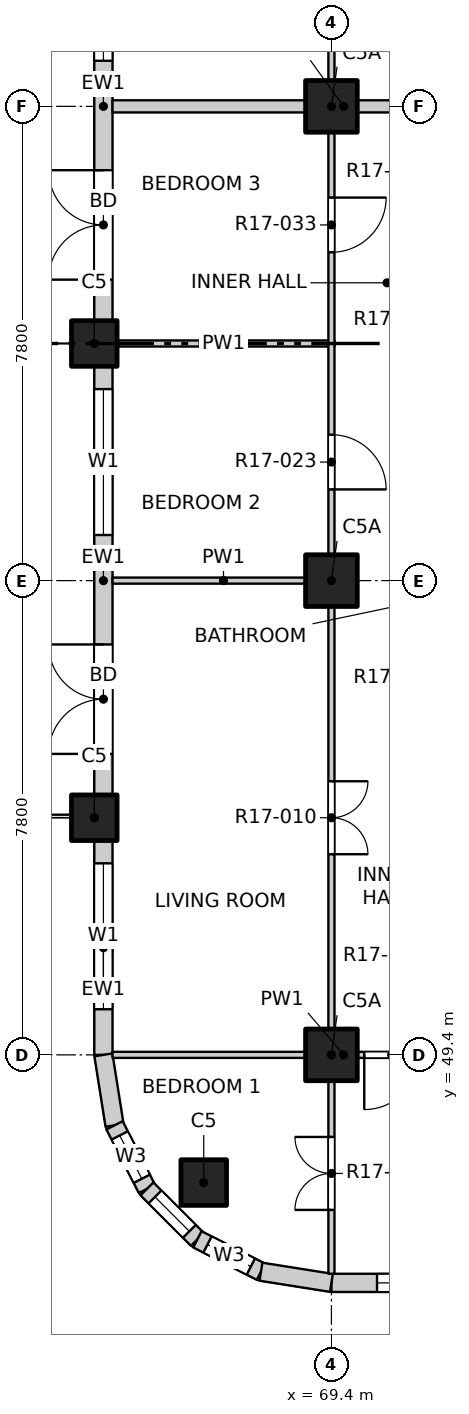
"""IFC4 building model, lengths in metres.
Left out: names, types, materials, properties, quantities, classifications, styles, units other than length and angle.
Written with IfcOpenShell. Run it as: python <this file> out.ifc"""

import sys

from ifc_helpers import new_model, si_unit, direction, frame, frame_2d, origin, origin_2d, place, context, subcontext, project, spatial, rectangle, extrude, element, fill, save


model = new_model("IFC4")
c1 = context("Model", 3, precision=1e-05, world=origin(), true_north=direction((0.0, 1.0)))
c2 = subcontext(c1, "Body", "Model", "MODEL_VIEW")
j1 = project(units=[si_unit("LENGTHUNIT", "METRE"), si_unit("PLANEANGLEUNIT", "RADIAN")], contexts=[c1])
p1 = place(None, origin())
s1 = spatial("IfcSite", under=j1, at=p1, CompositionType="ELEMENT")
p2 = place(p1, origin())
s2 = spatial("IfcBuilding", under=s1, at=p2, CompositionType="ELEMENT")
p3 = place(p2, frame((0.0, 0.0, 182.6)))
s3 = spatial("IfcBuildingStorey", under=s2, at=p3, CompositionType="ELEMENT", Elevation=182.6)
for number, where, z_axis, x_axis in (
    (1, (67.3, 47.3, -0.25), (0.0, 0.0, 1.0), (1.0, 0.0, 0.0)),
    (2, (65.5, 53.3, -0.25), (0.0, 0.0, 1.0), (1.0, 0.0, 0.0)),
    (3, (65.5, 61.1, -0.25), (0.0, 0.0, 1.0), (1.0, 0.0, 0.0)),
):
    element("IfcColumn", number, at=place(p3, frame(where, z_axis=z_axis, x_axis=x_axis)), inside=s3, PredefinedType="COLUMN", context=c2, shape_type="SweptSolid", body=[
        extrude(rectangle(XDim=0.75, YDim=0.75, at=origin_2d()), origin(), (0.0, 0.0, 1.0), 3.4),
    ])
for number, where, z_axis, x_axis in (
    (4, (69.4, 49.4, -0.25), (0.0, 0.0, 1.0), (1.0, 0.0, 0.0)),
    (5, (69.4, 57.2, -0.25), (0.0, 0.0, 1.0), (1.0, 0.0, 0.0)),
    (6, (69.4, 65.0, -0.25), (0.0, 0.0, 1.0), (1.0, 0.0, 0.0)),
):
    element("IfcColumn", number, at=place(p3, frame(where, z_axis=z_axis, x_axis=x_axis)), inside=s3, PredefinedType="COLUMN", context=c2, shape_type="SweptSolid", body=[
        extrude(rectangle(XDim=0.85, YDim=0.85, at=origin_2d()), origin(), (0.0, 0.0, 1.0), 3.4),
    ])
p4 = place(p3, frame((69.4, 45.65, 0.0), z_axis=(0.0, 0.0, 1.0), x_axis=(1.0, 0.0, 0.0)))
e7 = element("IfcWall", 7, at=p4, inside=s3, PredefinedType="SOLIDWALL", context=c2, shape_type="SweptSolid", body=[
    extrude(rectangle(XDim=3.525, YDim=0.3, at=frame_2d((1.763, 0.0))), origin(), (0.0, 0.0, 1.0), 2.7),
])
p5 = place(p4, frame((0.75, 0.0, 0.9)))
e8 = element("IfcOpeningElement", 8, at=p5, cuts=e7, PredefinedType="OPENING", context=c2, shape_type="SweptSolid", body=[
    extrude(rectangle(XDim=2.4, YDim=1.8, at=frame_2d((1.2, 0.9))), frame((0.0, 0.16, 0.0), z_axis=(0.0, -1.0, 0.0), x_axis=(1.0, 0.0, 0.0)), (0.0, 0.0, 1.0), 0.32),
])
p6 = place(p3, frame((65.65, 49.4, 0.0), z_axis=(0.0, 0.0, 1.0), x_axis=(0.0, 1.0, 0.0)))
e9 = element("IfcWall", 9, at=p6, inside=s3, PredefinedType="SOLIDWALL", context=c2, shape_type="SweptSolid", body=[
    extrude(rectangle(XDim=3.525, YDim=0.3, at=frame_2d((1.763, 0.0))), origin(), (0.0, 0.0, 1.0), 2.7),
])
p7 = place(p6, frame((0.75, 0.0, 0.9)))
e10 = element("IfcOpeningElement", 10, at=p7, cuts=e9, PredefinedType="OPENING", context=c2, shape_type="SweptSolid", body=[
    extrude(rectangle(XDim=2.4, YDim=1.8, at=frame_2d((1.2, 0.9))), frame((0.0, 0.16, 0.0), z_axis=(0.0, -1.0, 0.0), x_axis=(1.0, 0.0, 0.0)), (0.0, 0.0, 1.0), 0.32),
])
p8 = place(p3, frame((65.65, 53.675, 0.0), z_axis=(0.0, 0.0, 1.0), x_axis=(0.0, 1.0, 0.0)))
e11 = element("IfcWall", 11, at=p8, inside=s3, PredefinedType="SOLIDWALL", context=c2, shape_type="SweptSolid", body=[
    extrude(rectangle(XDim=7.05, YDim=0.3, at=frame_2d((3.525, 0.0))), origin(), (0.0, 0.0, 1.0), 2.7),
])
p9 = place(p8, frame((0.675, 0.0, 0.0)))
e12 = element("IfcOpeningElement", 12, at=p9, cuts=e11, PredefinedType="OPENING", context=c2, shape_type="SweptSolid", body=[
    extrude(rectangle(XDim=1.8, YDim=2.4, at=frame_2d((0.9, 1.2))), frame((0.0, 0.16, 0.0), z_axis=(0.0, -1.0, 0.0), x_axis=(1.0, 0.0, 0.0)), (0.0, 0.0, 1.0), 0.32),
])
p10 = place(p8, frame((4.275, 0.0, 0.9)))
e13 = element("IfcOpeningElement", 13, at=p10, cuts=e11, PredefinedType="OPENING", context=c2, shape_type="SweptSolid", body=[
    extrude(rectangle(XDim=2.4, YDim=1.8, at=frame_2d((1.2, 0.9))), frame((0.0, 0.16, 0.0), z_axis=(0.0, -1.0, 0.0), x_axis=(1.0, 0.0, 0.0)), (0.0, 0.0, 1.0), 0.32),
])
p11 = place(p3, frame((65.65, 61.475, 0.0), z_axis=(0.0, 0.0, 1.0), x_axis=(0.0, 1.0, 0.0)))
e14 = element("IfcWall", 14, at=p11, inside=s3, PredefinedType="SOLIDWALL", context=c2, shape_type="SweptSolid", body=[
    extrude(rectangle(XDim=7.05, YDim=0.3, at=frame_2d((3.525, 0.0))), origin(), (0.0, 0.0, 1.0), 2.7),
])
p12 = place(p11, frame((0.675, 0.0, 0.0)))
e15 = element("IfcOpeningElement", 15, at=p12, cuts=e14, PredefinedType="OPENING", context=c2, shape_type="SweptSolid", body=[
    extrude(rectangle(XDim=1.8, YDim=2.4, at=frame_2d((0.9, 1.2))), frame((0.0, 0.16, 0.0), z_axis=(0.0, -1.0, 0.0), x_axis=(1.0, 0.0, 0.0)), (0.0, 0.0, 1.0), 0.32),
])
p13 = place(p11, frame((4.275, 0.0, 0.9)))
e16 = element("IfcOpeningElement", 16, at=p13, cuts=e14, PredefinedType="OPENING", context=c2, shape_type="SweptSolid", body=[
    extrude(rectangle(XDim=2.4, YDim=1.8, at=frame_2d((1.2, 0.9))), frame((0.0, 0.16, 0.0), z_axis=(0.0, -1.0, 0.0), x_axis=(1.0, 0.0, 0.0)), (0.0, 0.0, 1.0), 0.32),
])
p14 = place(p3, frame((65.65, 49.4, 0.0), z_axis=(0.0, 0.0, 1.0), x_axis=(0.156496880861, -0.987678452879, 0.0)))
e17 = element("IfcWall", 17, at=p14, inside=s3, PredefinedType="SOLIDWALL", context=c2, shape_type="SweptSolid", body=[
    extrude(rectangle(XDim=1.173, YDim=0.3, at=frame_2d((0.586, 0.0))), origin(), (0.0, 0.0, 1.0), 2.7),
])
p15 = place(p3, frame((65.833, 48.241, 0.0), z_axis=(0.0, 0.0, 1.0), x_axis=(0.454025524128, -0.890988677504, 0.0)))
e18 = element("IfcWall", 18, at=p15, inside=s3, PredefinedType="SOLIDWALL", context=c2, shape_type="SweptSolid", body=[
    extrude(rectangle(XDim=1.173, YDim=0.3, at=frame_2d((0.587, 0.0))), origin(), (0.0, 0.0, 1.0), 2.7),
])
p16 = place(p15, frame((0.187, 0.0, 0.9)))
e19 = element("IfcOpeningElement", 19, at=p16, cuts=e18, PredefinedType="OPENING", context=c2, shape_type="SweptSolid", body=[
    extrude(rectangle(XDim=0.8, YDim=1.2, at=frame_2d((0.4, 0.6))), frame((0.0, 0.16, 0.0), z_axis=(0.0, -1.0, 0.0), x_axis=(1.0, 0.0, 0.0)), (0.0, 0.0, 1.0), 0.32),
])
p17 = place(p3, frame((66.366, 47.196, 0.0), z_axis=(0.0, 0.0, 1.0), x_axis=(0.707106781187, -0.707106781187, 0.0)))
e20 = element("IfcWall", 20, at=p17, inside=s3, PredefinedType="SOLIDWALL", context=c2, shape_type="SweptSolid", body=[
    extrude(rectangle(XDim=1.173, YDim=0.3, at=frame_2d((0.586, 0.0))), origin(), (0.0, 0.0, 1.0), 2.7),
])
p18 = place(p17, frame((0.187, 0.0, 0.9)))
e21 = element("IfcOpeningElement", 21, at=p18, cuts=e20, PredefinedType="OPENING", context=c2, shape_type="SweptSolid", body=[
    extrude(rectangle(XDim=0.8, YDim=1.2, at=frame_2d((0.4, 0.6))), frame((0.0, 0.16, 0.0), z_axis=(0.0, -1.0, 0.0), x_axis=(1.0, 0.0, 0.0)), (0.0, 0.0, 1.0), 0.32),
])
p19 = place(p3, frame((67.196, 46.366, 0.0), z_axis=(0.0, 0.0, 1.0), x_axis=(0.890988677504, -0.454025524128, 0.0)))
e22 = element("IfcWall", 22, at=p19, inside=s3, PredefinedType="SOLIDWALL", context=c2, shape_type="SweptSolid", body=[
    extrude(rectangle(XDim=1.173, YDim=0.3, at=frame_2d((0.587, 0.0))), origin(), (0.0, 0.0, 1.0), 2.7),
])
p20 = place(p19, frame((0.187, 0.0, 0.9)))
e23 = element("IfcOpeningElement", 23, at=p20, cuts=e22, PredefinedType="OPENING", context=c2, shape_type="SweptSolid", body=[
    extrude(rectangle(XDim=0.8, YDim=1.2, at=frame_2d((0.4, 0.6))), frame((0.0, 0.16, 0.0), z_axis=(0.0, -1.0, 0.0), x_axis=(1.0, 0.0, 0.0)), (0.0, 0.0, 1.0), 0.32),
])
p21 = place(p3, frame((68.241, 45.833, 0.0), z_axis=(0.0, 0.0, 1.0), x_axis=(0.987678452879, -0.156496880861, 0.0)))
e24 = element("IfcWall", 24, at=p21, inside=s3, PredefinedType="SOLIDWALL", context=c2, shape_type="SweptSolid", body=[
    extrude(rectangle(XDim=1.173, YDim=0.3, at=frame_2d((0.586, 0.0))), origin(), (0.0, 0.0, 1.0), 2.7),
])
p22 = place(p3, frame((65.8, 49.4, 0.0), z_axis=(0.0, 0.0, 1.0), x_axis=(1.0, 0.0, 0.0)))
e25 = element("IfcWall", 25, at=p22, inside=s3, PredefinedType="PARTITIONING", context=c2, shape_type="SweptSolid", body=[
    extrude(rectangle(XDim=7.6, YDim=0.1, at=frame_2d((3.8, 0.0))), origin(), (0.0, 0.0, 1.0), 3.15),
])
p23 = place(p22, frame((4.14, 0.0, 0.0)))
e26 = element("IfcOpeningElement", 26, at=p23, cuts=e25, PredefinedType="OPENING", context=c2, shape_type="SweptSolid", body=[
    extrude(rectangle(XDim=0.9, YDim=2.1, at=frame_2d((0.45, 1.05))), frame((0.0, 0.06, 0.0), z_axis=(0.0, -1.0, 0.0), x_axis=(1.0, 0.0, 0.0)), (0.0, 0.0, 1.0), 0.12),
])
p24 = place(p3, frame((65.8, 57.2, 0.0), z_axis=(0.0, 0.0, 1.0), x_axis=(1.0, 0.0, 0.0)))
e27 = element("IfcWall", 27, at=p24, inside=s3, PredefinedType="PARTITIONING", context=c2, shape_type="SweptSolid", body=[
    extrude(rectangle(XDim=3.65, YDim=0.1, at=frame_2d((1.825, 0.0))), origin(), (0.0, 0.0, 1.0), 3.15),
])
p25 = place(p3, frame((65.8, 61.1, 0.0), z_axis=(0.0, 0.0, 1.0), x_axis=(1.0, 0.0, 0.0)))
e28 = element("IfcWall", 28, at=p25, inside=s3, PredefinedType="PARTITIONING", context=c2, shape_type="SweptSolid", body=[
    extrude(rectangle(XDim=3.65, YDim=0.1, at=frame_2d((1.825, 0.0))), origin(), (0.0, 0.0, 1.0), 2.55),
])
p26 = place(p3, frame((65.8, 65.0, 0.0), z_axis=(0.0, 0.0, 1.0), x_axis=(1.0, 0.0, 0.0)))
e29 = element("IfcWall", 29, at=p26, inside=s3, PredefinedType="PARTITIONING", context=c2, shape_type="SweptSolid", body=[
    extrude(rectangle(XDim=7.6, YDim=0.2, at=frame_2d((3.8, 0.0))), origin(), (0.0, 0.0, 1.0), 3.15),
])
p27 = place(p3, frame((69.4, 45.8, 0.0), z_axis=(0.0, 0.0, 1.0), x_axis=(0.0, 1.0, 0.0)))
e30 = element("IfcWall", 30, at=p27, inside=s3, PredefinedType="PARTITIONING", context=c2, shape_type="SweptSolid", body=[
    extrude(rectangle(XDim=38.4, YDim=0.1, at=frame_2d((19.2, 0.0))), origin(), (0.0, 0.0, 1.0), 3.15),
])
p28 = place(p27, frame((1.05, 0.0, 0.0)))
e31 = element("IfcOpeningElement", 31, at=p28, cuts=e30, PredefinedType="OPENING", context=c2, shape_type="SweptSolid", body=[
    extrude(rectangle(XDim=1.2, YDim=2.1, at=frame_2d((0.6, 1.05))), frame((0.0, 0.06, 0.0), z_axis=(0.0, -1.0, 0.0), x_axis=(1.0, 0.0, 0.0)), (0.0, 0.0, 1.0), 0.12),
])
p29 = place(p27, frame((6.9, 0.0, 0.0)))
e32 = element("IfcOpeningElement", 32, at=p29, cuts=e30, PredefinedType="OPENING", context=c2, shape_type="SweptSolid", body=[
    extrude(rectangle(XDim=1.2, YDim=2.1, at=frame_2d((0.6, 1.05))), frame((0.0, 0.06, 0.0), z_axis=(0.0, -1.0, 0.0), x_axis=(1.0, 0.0, 0.0)), (0.0, 0.0, 1.0), 0.12),
])
p30 = place(p27, frame((12.9, 0.0, 0.0)))
e33 = element("IfcOpeningElement", 33, at=p30, cuts=e30, PredefinedType="OPENING", context=c2, shape_type="SweptSolid", body=[
    extrude(rectangle(XDim=0.9, YDim=2.1, at=frame_2d((0.45, 1.05))), frame((0.0, 0.06, 0.0), z_axis=(0.0, -1.0, 0.0), x_axis=(1.0, 0.0, 0.0)), (0.0, 0.0, 1.0), 0.12),
])
p31 = place(p27, frame((16.8, 0.0, 0.0)))
e34 = element("IfcOpeningElement", 34, at=p31, cuts=e30, PredefinedType="OPENING", context=c2, shape_type="SweptSolid", body=[
    extrude(rectangle(XDim=0.9, YDim=2.1, at=frame_2d((0.45, 1.05))), frame((0.0, 0.06, 0.0), z_axis=(0.0, -1.0, 0.0), x_axis=(1.0, 0.0, 0.0)), (0.0, 0.0, 1.0), 0.12),
])
p32 = place(p27, frame((20.7, 0.0, 0.0)))
e35 = element("IfcOpeningElement", 35, at=p32, cuts=e30, PredefinedType="OPENING", context=c2, shape_type="SweptSolid", body=[
    extrude(rectangle(XDim=0.9, YDim=2.1, at=frame_2d((0.45, 1.05))), frame((0.0, 0.06, 0.0), z_axis=(0.0, -1.0, 0.0), x_axis=(1.0, 0.0, 0.0)), (0.0, 0.0, 1.0), 0.12),
])
p33 = place(p27, frame((24.6, 0.0, 0.0)))
e36 = element("IfcOpeningElement", 36, at=p33, cuts=e30, PredefinedType="OPENING", context=c2, shape_type="SweptSolid", body=[
    extrude(rectangle(XDim=0.9, YDim=2.1, at=frame_2d((0.45, 1.05))), frame((0.0, 0.06, 0.0), z_axis=(0.0, -1.0, 0.0), x_axis=(1.0, 0.0, 0.0)), (0.0, 0.0, 1.0), 0.12),
])
p34 = place(p27, frame((28.5, 0.0, 0.0)))
e37 = element("IfcOpeningElement", 37, at=p34, cuts=e30, PredefinedType="OPENING", context=c2, shape_type="SweptSolid", body=[
    extrude(rectangle(XDim=0.9, YDim=2.1, at=frame_2d((0.45, 1.05))), frame((0.0, 0.06, 0.0), z_axis=(0.0, -1.0, 0.0), x_axis=(1.0, 0.0, 0.0)), (0.0, 0.0, 1.0), 0.12),
])
p35 = place(p27, frame((32.4, 0.0, 0.0)))
e38 = element("IfcOpeningElement", 38, at=p35, cuts=e30, PredefinedType="OPENING", context=c2, shape_type="SweptSolid", body=[
    extrude(rectangle(XDim=0.9, YDim=2.1, at=frame_2d((0.45, 1.05))), frame((0.0, 0.06, 0.0), z_axis=(0.0, -1.0, 0.0), x_axis=(1.0, 0.0, 0.0)), (0.0, 0.0, 1.0), 0.12),
])
p36 = place(p27, frame((36.15, 0.0, 0.0)))
e39 = element("IfcOpeningElement", 39, at=p36, cuts=e30, PredefinedType="OPENING", context=c2, shape_type="SweptSolid", body=[
    extrude(rectangle(XDim=1.2, YDim=2.1, at=frame_2d((0.6, 1.05))), frame((0.0, 0.06, 0.0), z_axis=(0.0, -1.0, 0.0), x_axis=(1.0, 0.0, 0.0)), (0.0, 0.0, 1.0), 0.12),
])
p37 = place(p5, origin())
e40 = element("IfcWindow", 40, at=p37, inside=s3, PartitioningType="DOUBLE_PANEL_VERTICAL", PredefinedType="WINDOW", context=c2, shape_type="SweptSolid", body=[
    extrude(rectangle(XDim=2.4, YDim=1.8, at=frame_2d((1.2, 0.9))), frame((0.0, 0.03, 0.0), z_axis=(0.0, -1.0, 0.0), x_axis=(1.0, 0.0, 0.0)), (0.0, 0.0, 1.0), 0.06),
])
fill(e8, e40)
p38 = place(p7, origin())
e41 = element("IfcWindow", 41, at=p38, inside=s3, PartitioningType="DOUBLE_PANEL_VERTICAL", PredefinedType="WINDOW", context=c2, shape_type="SweptSolid", body=[
    extrude(rectangle(XDim=2.4, YDim=1.8, at=frame_2d((1.2, 0.9))), frame((0.0, 0.03, 0.0), z_axis=(0.0, -1.0, 0.0), x_axis=(1.0, 0.0, 0.0)), (0.0, 0.0, 1.0), 0.06),
])
fill(e10, e41)
p39 = place(p9, origin())
e42 = element("IfcDoor", 42, at=p39, inside=s3, OperationType="DOUBLE_DOOR_SINGLE_SWING", PredefinedType="DOOR", context=c2, shape_type="SweptSolid", body=[
    extrude(rectangle(XDim=1.8, YDim=2.4, at=frame_2d((0.9, 1.2))), frame((0.0, 0.025, 0.0), z_axis=(0.0, -1.0, 0.0), x_axis=(1.0, 0.0, 0.0)), (0.0, 0.0, 1.0), 0.05),
])
fill(e12, e42)
p40 = place(p10, origin())
e43 = element("IfcWindow", 43, at=p40, inside=s3, PartitioningType="DOUBLE_PANEL_VERTICAL", PredefinedType="WINDOW", context=c2, shape_type="SweptSolid", body=[
    extrude(rectangle(XDim=2.4, YDim=1.8, at=frame_2d((1.2, 0.9))), frame((0.0, 0.03, 0.0), z_axis=(0.0, -1.0, 0.0), x_axis=(1.0, 0.0, 0.0)), (0.0, 0.0, 1.0), 0.06),
])
fill(e13, e43)
p41 = place(p12, origin())
e44 = element("IfcDoor", 44, at=p41, inside=s3, OperationType="DOUBLE_DOOR_SINGLE_SWING", PredefinedType="DOOR", context=c2, shape_type="SweptSolid", body=[
    extrude(rectangle(XDim=1.8, YDim=2.4, at=frame_2d((0.9, 1.2))), frame((0.0, 0.025, 0.0), z_axis=(0.0, -1.0, 0.0), x_axis=(1.0, 0.0, 0.0)), (0.0, 0.0, 1.0), 0.05),
])
fill(e15, e44)
p42 = place(p13, origin())
e45 = element("IfcWindow", 45, at=p42, inside=s3, PartitioningType="DOUBLE_PANEL_VERTICAL", PredefinedType="WINDOW", context=c2, shape_type="SweptSolid", body=[
    extrude(rectangle(XDim=2.4, YDim=1.8, at=frame_2d((1.2, 0.9))), frame((0.0, 0.03, 0.0), z_axis=(0.0, -1.0, 0.0), x_axis=(1.0, 0.0, 0.0)), (0.0, 0.0, 1.0), 0.06),
])
fill(e16, e45)
p43 = place(p16, origin())
e46 = element("IfcWindow", 46, at=p43, inside=s3, PartitioningType="SINGLE_PANEL", PredefinedType="WINDOW", context=c2, shape_type="SweptSolid", body=[
    extrude(rectangle(XDim=0.8, YDim=1.2, at=frame_2d((0.4, 0.6))), frame((0.0, 0.03, 0.0), z_axis=(0.0, -1.0, 0.0), x_axis=(1.0, 0.0, 0.0)), (0.0, 0.0, 1.0), 0.06),
])
fill(e19, e46)
p44 = place(p18, origin())
e47 = element("IfcWindow", 47, at=p44, inside=s3, PartitioningType="SINGLE_PANEL", PredefinedType="WINDOW", context=c2, shape_type="SweptSolid", body=[
    extrude(rectangle(XDim=0.8, YDim=1.2, at=frame_2d((0.4, 0.6))), frame((0.0, 0.03, 0.0), z_axis=(0.0, -1.0, 0.0), x_axis=(1.0, 0.0, 0.0)), (0.0, 0.0, 1.0), 0.06),
])
fill(e21, e47)
p45 = place(p20, origin())
e48 = element("IfcWindow", 48, at=p45, inside=s3, PartitioningType="SINGLE_PANEL", PredefinedType="WINDOW", context=c2, shape_type="SweptSolid", body=[
    extrude(rectangle(XDim=0.8, YDim=1.2, at=frame_2d((0.4, 0.6))), frame((0.0, 0.03, 0.0), z_axis=(0.0, -1.0, 0.0), x_axis=(1.0, 0.0, 0.0)), (0.0, 0.0, 1.0), 0.06),
])
fill(e23, e48)
p46 = place(p28, origin())
e49 = element("IfcDoor", 49, at=p46, inside=s3, OperationType="DOUBLE_DOOR_SINGLE_SWING", PredefinedType="DOOR", context=c2, shape_type="SweptSolid", body=[
    extrude(rectangle(XDim=1.2, YDim=2.1, at=frame_2d((0.6, 1.05))), frame((0.0, 0.025, 0.0), z_axis=(0.0, -1.0, 0.0), x_axis=(1.0, 0.0, 0.0)), (0.0, 0.0, 1.0), 0.05),
])
fill(e31, e49)
p47 = place(p23, origin())
e50 = element("IfcDoor", 50, at=p47, inside=s3, OperationType="SINGLE_SWING_RIGHT", PredefinedType="DOOR", context=c2, shape_type="SweptSolid", body=[
    extrude(rectangle(XDim=0.9, YDim=2.1, at=frame_2d((0.45, 1.05))), frame((0.0, 0.025, 0.0), z_axis=(0.0, -1.0, 0.0), x_axis=(1.0, 0.0, 0.0)), (0.0, 0.0, 1.0), 0.05),
])
fill(e26, e50)
p48 = place(p29, origin())
e51 = element("IfcDoor", 51, at=p48, inside=s3, OperationType="DOUBLE_DOOR_SINGLE_SWING", PredefinedType="DOOR", context=c2, shape_type="SweptSolid", body=[
    extrude(rectangle(XDim=1.2, YDim=2.1, at=frame_2d((0.6, 1.05))), frame((0.0, 0.025, 0.0), z_axis=(0.0, -1.0, 0.0), x_axis=(1.0, 0.0, 0.0)), (0.0, 0.0, 1.0), 0.05),
])
fill(e32, e51)
p49 = place(p30, origin())
e52 = element("IfcDoor", 52, at=p49, inside=s3, OperationType="SINGLE_SWING_RIGHT", PredefinedType="DOOR", context=c2, shape_type="SweptSolid", body=[
    extrude(rectangle(XDim=0.9, YDim=2.1, at=frame_2d((0.45, 1.05))), frame((0.0, 0.025, 0.0), z_axis=(0.0, -1.0, 0.0), x_axis=(1.0, 0.0, 0.0)), (0.0, 0.0, 1.0), 0.05),
])
fill(e33, e52)
p50 = place(p31, origin())
e53 = element("IfcDoor", 53, at=p50, inside=s3, OperationType="SINGLE_SWING_LEFT", PredefinedType="DOOR", context=c2, shape_type="SweptSolid", body=[
    extrude(rectangle(XDim=0.9, YDim=2.1, at=frame_2d((0.45, 1.05))), frame((0.0, 0.025, 0.0), z_axis=(0.0, -1.0, 0.0), x_axis=(1.0, 0.0, 0.0)), (0.0, 0.0, 1.0), 0.05),
])
fill(e34, e53)
save(model, sys.argv[1])
